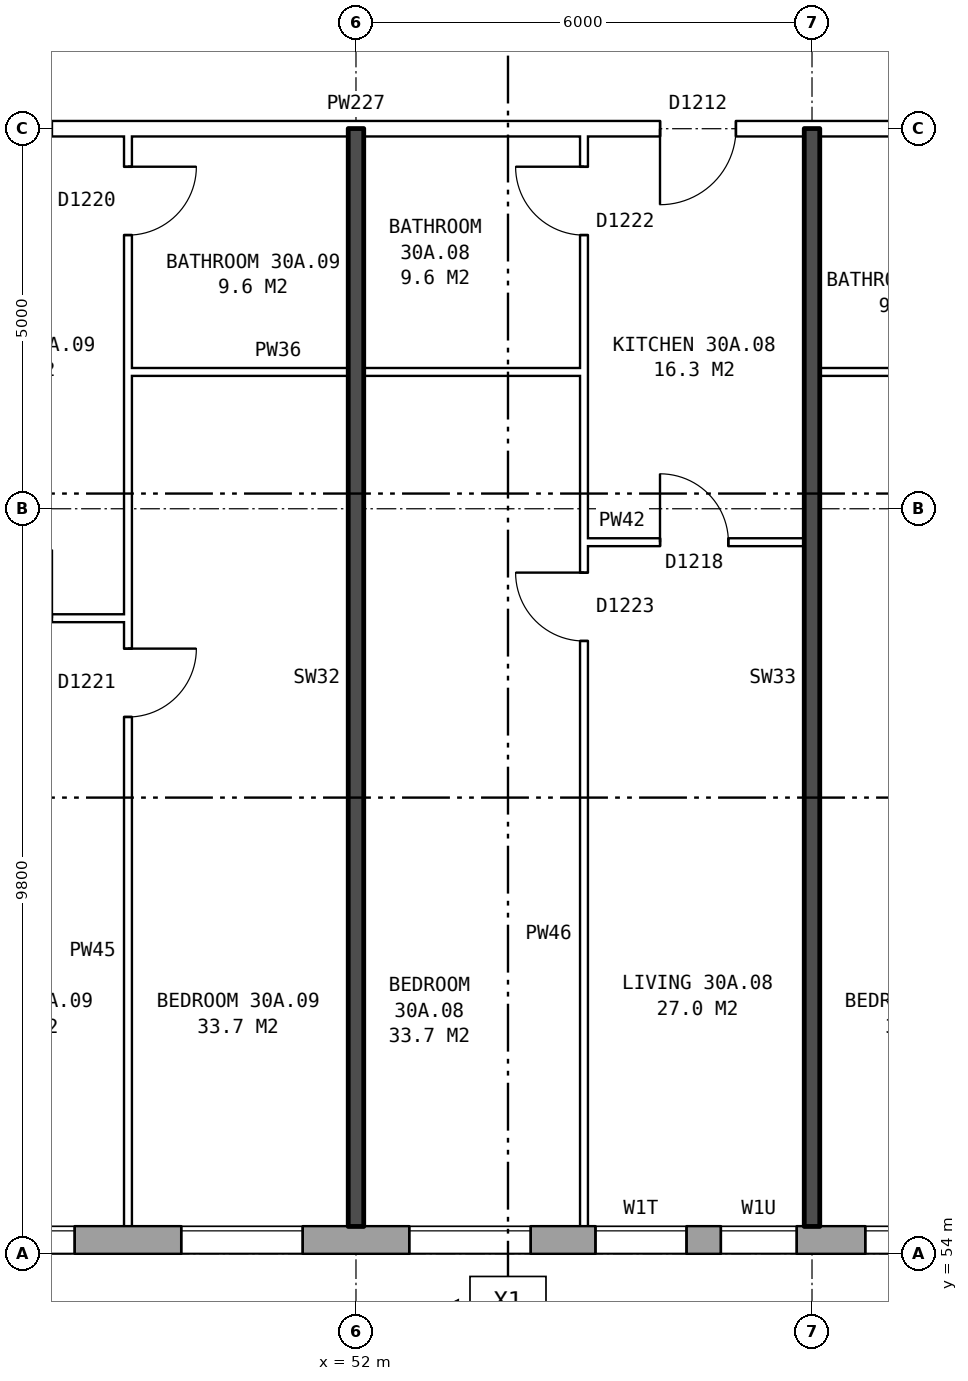
"""IFC4 building model, lengths in metres.
Left out: names, types, materials, properties, quantities, classifications, styles, units other than length and angle.
Written with IfcOpenShell. Run it as: python <this file> out.ifc"""

import sys

from ifc_helpers import new_model, si_unit, direction, frame, frame_2d, origin, place, context, subcontext, project, spatial, rectangle, extrude, element, fill, save


model = new_model("IFC4")
c1 = context("Model", 3, precision=1e-05, world=origin(), true_north=direction((0.0, 1.0)))
c2 = subcontext(c1, "Body", "Model", "MODEL_VIEW")
j1 = project(units=[si_unit("LENGTHUNIT", "METRE"), si_unit("PLANEANGLEUNIT", "RADIAN")], contexts=[c1])
p1 = place(None, origin())
s1 = spatial("IfcSite", under=j1, at=p1, CompositionType="ELEMENT")
p2 = place(p1, origin())
s2 = spatial("IfcBuilding", under=s1, at=p2, CompositionType="ELEMENT")
p3 = place(p2, frame((0.0, 0.0, 108.8)))
s3 = spatial("IfcBuildingStorey", under=s2, at=p3, CompositionType="ELEMENT", Elevation=108.8)
p4 = place(p3, frame((28.075, 54.18, 0.0), z_axis=(0.0, 0.0, 1.0), x_axis=(1.0, 0.0, 0.0)))
e1 = element("IfcWall", 1, at=p4, inside=s3, PredefinedType="STANDARD", context=c2, shape_type="SweptSolid", body=[
    extrude(rectangle(XDim=44.851, YDim=0.36, at=frame_2d((22.425, 0.0))), origin(), (0.0, 0.0, 1.0), 2.85),
])
p5 = place(p4, frame((0.625, 0.0, 0.8)))
e2 = element("IfcOpeningElement", 2, at=p5, cuts=e1, PredefinedType="OPENING", context=c2, shape_type="SweptSolid", body=[
    extrude(rectangle(XDim=1.6, YDim=1.8, at=frame_2d((0.8, 0.9))), frame((0.0, 0.19, 0.0), z_axis=(0.0, -1.0, 0.0), x_axis=(1.0, 0.0, 0.0)), (0.0, 0.0, 1.0), 0.38),
])
p6 = place(p4, frame((3.625, 0.0, 0.8)))
e3 = element("IfcOpeningElement", 3, at=p6, cuts=e1, PredefinedType="OPENING", context=c2, shape_type="SweptSolid", body=[
    extrude(rectangle(XDim=1.6, YDim=1.8, at=frame_2d((0.8, 0.9))), frame((0.0, 0.19, 0.0), z_axis=(0.0, -1.0, 0.0), x_axis=(1.0, 0.0, 0.0)), (0.0, 0.0, 1.0), 0.38),
])
p7 = place(p4, frame((6.625, 0.0, 0.8)))
e4 = element("IfcOpeningElement", 4, at=p7, cuts=e1, PredefinedType="OPENING", context=c2, shape_type="SweptSolid", body=[
    extrude(rectangle(XDim=1.6, YDim=1.8, at=frame_2d((0.8, 0.9))), frame((0.0, 0.19, 0.0), z_axis=(0.0, -1.0, 0.0), x_axis=(1.0, 0.0, 0.0)), (0.0, 0.0, 1.0), 0.38),
])
p8 = place(p4, frame((9.625, 0.0, 0.8)))
e5 = element("IfcOpeningElement", 5, at=p8, cuts=e1, PredefinedType="OPENING", context=c2, shape_type="SweptSolid", body=[
    extrude(rectangle(XDim=1.6, YDim=1.8, at=frame_2d((0.8, 0.9))), frame((0.0, 0.19, 0.0), z_axis=(0.0, -1.0, 0.0), x_axis=(1.0, 0.0, 0.0)), (0.0, 0.0, 1.0), 0.38),
])
p9 = place(p4, frame((12.625, 0.0, 0.8)))
e6 = element("IfcOpeningElement", 6, at=p9, cuts=e1, PredefinedType="OPENING", context=c2, shape_type="SweptSolid", body=[
    extrude(rectangle(XDim=1.6, YDim=1.8, at=frame_2d((0.8, 0.9))), frame((0.0, 0.19, 0.0), z_axis=(0.0, -1.0, 0.0), x_axis=(1.0, 0.0, 0.0)), (0.0, 0.0, 1.0), 0.38),
])
p10 = place(p4, frame((14.525, 0.0, 1.4)))
e7 = element("IfcOpeningElement", 7, at=p10, cuts=e1, PredefinedType="OPENING", context=c2, shape_type="SweptSolid", body=[
    extrude(rectangle(XDim=1.2, YDim=1.2, at=frame_2d((0.6, 0.6))), frame((0.0, 0.19, 0.0), z_axis=(0.0, -1.0, 0.0), x_axis=(1.0, 0.0, 0.0)), (0.0, 0.0, 1.0), 0.38),
])
p11 = place(p4, frame((18.625, 0.0, 0.8)))
e8 = element("IfcOpeningElement", 8, at=p11, cuts=e1, PredefinedType="OPENING", context=c2, shape_type="SweptSolid", body=[
    extrude(rectangle(XDim=1.6, YDim=1.8, at=frame_2d((0.8, 0.9))), frame((0.0, 0.19, 0.0), z_axis=(0.0, -1.0, 0.0), x_axis=(1.0, 0.0, 0.0)), (0.0, 0.0, 1.0), 0.38),
])
p12 = place(p4, frame((21.625, 0.0, 0.8)))
e9 = element("IfcOpeningElement", 9, at=p12, cuts=e1, PredefinedType="OPENING", context=c2, shape_type="SweptSolid", body=[
    extrude(rectangle(XDim=1.6, YDim=1.8, at=frame_2d((0.8, 0.9))), frame((0.0, 0.19, 0.0), z_axis=(0.0, -1.0, 0.0), x_axis=(1.0, 0.0, 0.0)), (0.0, 0.0, 1.0), 0.38),
])
p13 = place(p4, frame((24.625, 0.0, 0.8)))
e10 = element("IfcOpeningElement", 10, at=p13, cuts=e1, PredefinedType="OPENING", context=c2, shape_type="SweptSolid", body=[
    extrude(rectangle(XDim=1.6, YDim=1.8, at=frame_2d((0.8, 0.9))), frame((0.0, 0.19, 0.0), z_axis=(0.0, -1.0, 0.0), x_axis=(1.0, 0.0, 0.0)), (0.0, 0.0, 1.0), 0.38),
])
p14 = place(p4, frame((27.075, 0.0, 0.15)))
e11 = element("IfcOpeningElement", 11, at=p14, cuts=e1, PredefinedType="OPENING", context=c2, shape_type="SweptSolid", body=[
    extrude(rectangle(XDim=1.2, YDim=0.9, at=frame_2d((0.6, 0.45))), frame((0.0, 0.19, 0.0), z_axis=(0.0, -1.0, 0.0), x_axis=(1.0, 0.0, 0.0)), (0.0, 0.0, 1.0), 0.38),
])
p15 = place(p4, frame((30.625, 0.0, 0.8)))
e12 = element("IfcOpeningElement", 12, at=p15, cuts=e1, PredefinedType="OPENING", context=c2, shape_type="SweptSolid", body=[
    extrude(rectangle(XDim=1.6, YDim=1.8, at=frame_2d((0.8, 0.9))), frame((0.0, 0.19, 0.0), z_axis=(0.0, -1.0, 0.0), x_axis=(1.0, 0.0, 0.0)), (0.0, 0.0, 1.0), 0.38),
])
p16 = place(p4, frame((33.625, 0.0, 0.8)))
e13 = element("IfcOpeningElement", 13, at=p16, cuts=e1, PredefinedType="OPENING", context=c2, shape_type="SweptSolid", body=[
    extrude(rectangle(XDim=1.6, YDim=1.8, at=frame_2d((0.8, 0.9))), frame((0.0, 0.19, 0.0), z_axis=(0.0, -1.0, 0.0), x_axis=(1.0, 0.0, 0.0)), (0.0, 0.0, 1.0), 0.38),
])
p17 = place(p4, frame((36.625, 0.0, 0.8)))
e14 = element("IfcOpeningElement", 14, at=p17, cuts=e1, PredefinedType="OPENING", context=c2, shape_type="SweptSolid", body=[
    extrude(rectangle(XDim=1.6, YDim=1.8, at=frame_2d((0.8, 0.9))), frame((0.0, 0.19, 0.0), z_axis=(0.0, -1.0, 0.0), x_axis=(1.0, 0.0, 0.0)), (0.0, 0.0, 1.0), 0.38),
])
p18 = place(p4, frame((39.625, 0.0, 0.8)))
e15 = element("IfcOpeningElement", 15, at=p18, cuts=e1, PredefinedType="OPENING", context=c2, shape_type="SweptSolid", body=[
    extrude(rectangle(XDim=1.6, YDim=1.8, at=frame_2d((0.8, 0.9))), frame((0.0, 0.19, 0.0), z_axis=(0.0, -1.0, 0.0), x_axis=(1.0, 0.0, 0.0)), (0.0, 0.0, 1.0), 0.38),
])
p19 = place(p4, frame((42.625, 0.0, 0.8)))
e16 = element("IfcOpeningElement", 16, at=p19, cuts=e1, PredefinedType="OPENING", context=c2, shape_type="SweptSolid", body=[
    extrude(rectangle(XDim=1.6, YDim=1.8, at=frame_2d((0.8, 0.9))), frame((0.0, 0.19, 0.0), z_axis=(0.0, -1.0, 0.0), x_axis=(1.0, 0.0, 0.0)), (0.0, 0.0, 1.0), 0.38),
])
p20 = place(p4, frame((28.725, 0.0, 1.65)))
e17 = element("IfcOpeningElement", 17, at=p20, cuts=e1, PredefinedType="OPENING", context=c2, shape_type="SweptSolid", body=[
    extrude(rectangle(XDim=1.0, YDim=0.9, at=frame_2d((0.5, 0.45))), frame((0.0, 0.19, 0.0), z_axis=(0.0, -1.0, 0.0), x_axis=(1.0, 0.0, 0.0)), (0.0, 0.0, 1.0), 0.38),
])
p21 = place(p3, frame((46.1, 62.36, 0.0), z_axis=(0.0, 0.0, 1.0), x_axis=(1.0, 0.0, 0.0)))
e18 = element("IfcWall", 18, at=p21, inside=s3, PredefinedType="PARTITIONING", context=c2, shape_type="SweptSolid", body=[
    extrude(rectangle(XDim=2.9, YDim=0.1, at=frame_2d((1.45, 0.0))), origin(), (0.0, 0.0, 1.0), 2.85),
])
p22 = place(p21, frame((1.0, 0.0, 0.0)))
e19 = element("IfcOpeningElement", 19, at=p22, cuts=e18, PredefinedType="OPENING", context=c2, shape_type="SweptSolid", body=[
    extrude(rectangle(XDim=0.9, YDim=2.1, at=frame_2d((0.45, 1.05))), frame((0.0, 0.06, 0.0), z_axis=(0.0, -1.0, 0.0), x_axis=(1.0, 0.0, 0.0)), (0.0, 0.0, 1.0), 0.12),
])
p23 = place(p3, frame((55.0, 63.36, 0.0), z_axis=(0.0, 0.0, 1.0), x_axis=(1.0, 0.0, 0.0)))
e20 = element("IfcWall", 20, at=p23, inside=s3, PredefinedType="PARTITIONING", context=c2, shape_type="SweptSolid", body=[
    extrude(rectangle(XDim=2.9, YDim=0.1, at=frame_2d((1.45, 0.0))), origin(), (0.0, 0.0, 1.0), 2.85),
])
p24 = place(p23, frame((1.0, 0.0, 0.0)))
e21 = element("IfcOpeningElement", 21, at=p24, cuts=e20, PredefinedType="OPENING", context=c2, shape_type="SweptSolid", body=[
    extrude(rectangle(XDim=0.9, YDim=2.1, at=frame_2d((0.45, 1.05))), frame((0.0, 0.06, 0.0), z_axis=(0.0, -1.0, 0.0), x_axis=(1.0, 0.0, 0.0)), (0.0, 0.0, 1.0), 0.12),
])
p25 = place(p3, frame((49.0, 65.6, 0.0), z_axis=(0.0, 0.0, 1.0), x_axis=(1.0, 0.0, 0.0)))
e22 = element("IfcWall", 22, at=p25, inside=s3, PredefinedType="PARTITIONING", context=c2, shape_type="SweptSolid", body=[
    extrude(rectangle(XDim=6.0, YDim=0.1, at=frame_2d((3.0, 0.0))), origin(), (0.0, 0.0, 1.0), 2.85),
])
p26 = place(p3, frame((58.1, 65.6, 0.0), z_axis=(0.0, 0.0, 1.0), x_axis=(1.0, 0.0, 0.0)))
e23 = element("IfcWall", 23, at=p26, inside=s3, PredefinedType="PARTITIONING", context=c2, shape_type="SweptSolid", body=[
    extrude(rectangle(XDim=2.9, YDim=0.1, at=frame_2d((1.45, 0.0))), origin(), (0.0, 0.0, 1.0), 2.85),
])
p27 = place(p3, frame((44.36, 68.8, 0.0), z_axis=(0.0, 0.0, 1.0), x_axis=(1.0, 0.0, 0.0)))
e24 = element("IfcWall", 24, at=p27, inside=s3, PredefinedType="PARTITIONING", context=c2, shape_type="SweptSolid", body=[
    extrude(rectangle(XDim=19.28, YDim=0.2, at=frame_2d((9.64, 0.0))), origin(), (0.0, 0.0, 1.0), 2.85),
])
p28 = place(p27, frame((17.46, 0.0, 0.0)))
e25 = element("IfcOpeningElement", 25, at=p28, cuts=e24, PredefinedType="OPENING", context=c2, shape_type="SweptSolid", body=[
    extrude(rectangle(XDim=1.0, YDim=2.1, at=frame_2d((0.5, 1.05))), frame((0.0, 0.11, 0.0), z_axis=(0.0, -1.0, 0.0), x_axis=(1.0, 0.0, 0.0)), (0.0, 0.0, 1.0), 0.22),
])
p29 = place(p27, frame((11.64, 0.0, 0.0)))
e26 = element("IfcOpeningElement", 26, at=p29, cuts=e24, PredefinedType="OPENING", context=c2, shape_type="SweptSolid", body=[
    extrude(rectangle(XDim=1.0, YDim=2.1, at=frame_2d((0.5, 1.05))), frame((0.0, 0.11, 0.0), z_axis=(0.0, -1.0, 0.0), x_axis=(1.0, 0.0, 0.0)), (0.0, 0.0, 1.0), 0.22),
])
p30 = place(p27, frame((2.64, 0.0, 0.0)))
e27 = element("IfcOpeningElement", 27, at=p30, cuts=e24, PredefinedType="OPENING", context=c2, shape_type="SweptSolid", body=[
    extrude(rectangle(XDim=1.0, YDim=2.1, at=frame_2d((0.5, 1.05))), frame((0.0, 0.11, 0.0), z_axis=(0.0, -1.0, 0.0), x_axis=(1.0, 0.0, 0.0)), (0.0, 0.0, 1.0), 0.22),
])
p31 = place(p3, frame((49.0, 54.36, 0.0), z_axis=(0.0, 0.0, 1.0), x_axis=(0.0, 1.0, 0.0)))
e28 = element("IfcWall", 28, at=p31, inside=s3, PredefinedType="PARTITIONING", context=c2, shape_type="SweptSolid", body=[
    extrude(rectangle(XDim=14.34, YDim=0.1, at=frame_2d((7.17, 0.0))), origin(), (0.0, 0.0, 1.0), 2.85),
])
p32 = place(p31, frame((6.7, 0.0, 0.0)))
e29 = element("IfcOpeningElement", 29, at=p32, cuts=e28, PredefinedType="OPENING", context=c2, shape_type="SweptSolid", body=[
    extrude(rectangle(XDim=0.9, YDim=2.1, at=frame_2d((0.45, 1.05))), frame((0.0, 0.06, 0.0), z_axis=(0.0, -1.0, 0.0), x_axis=(1.0, 0.0, 0.0)), (0.0, 0.0, 1.0), 0.12),
])
p33 = place(p31, frame((13.04, 0.0, 0.0)))
e30 = element("IfcOpeningElement", 30, at=p33, cuts=e28, PredefinedType="OPENING", context=c2, shape_type="SweptSolid", body=[
    extrude(rectangle(XDim=0.9, YDim=2.1, at=frame_2d((0.45, 1.05))), frame((0.0, 0.06, 0.0), z_axis=(0.0, -1.0, 0.0), x_axis=(1.0, 0.0, 0.0)), (0.0, 0.0, 1.0), 0.12),
])
p34 = place(p3, frame((52.0, 54.36, 0.0), z_axis=(0.0, 0.0, 1.0), x_axis=(0.0, 1.0, 0.0)))
e31 = element("IfcWall", 31, at=p34, inside=s3, PredefinedType="SOLIDWALL", context=c2, shape_type="SweptSolid", body=[
    extrude(rectangle(XDim=14.44, YDim=0.2, at=frame_2d((7.22, 0.0))), origin(), (0.0, 0.0, 1.0), 2.85),
])
p35 = place(p3, frame((55.0, 54.36, 0.0), z_axis=(0.0, 0.0, 1.0), x_axis=(0.0, 1.0, 0.0)))
e32 = element("IfcWall", 32, at=p35, inside=s3, PredefinedType="PARTITIONING", context=c2, shape_type="SweptSolid", body=[
    extrude(rectangle(XDim=14.34, YDim=0.1, at=frame_2d((7.17, 0.0))), origin(), (0.0, 0.0, 1.0), 2.85),
])
p36 = place(p35, frame((7.7, 0.0, 0.0)))
e33 = element("IfcOpeningElement", 33, at=p36, cuts=e32, PredefinedType="OPENING", context=c2, shape_type="SweptSolid", body=[
    extrude(rectangle(XDim=0.9, YDim=2.1, at=frame_2d((0.45, 1.05))), frame((0.0, 0.06, 0.0), z_axis=(0.0, -1.0, 0.0), x_axis=(1.0, 0.0, 0.0)), (0.0, 0.0, 1.0), 0.12),
])
p37 = place(p35, frame((13.04, 0.0, 0.0)))
e34 = element("IfcOpeningElement", 34, at=p37, cuts=e32, PredefinedType="OPENING", context=c2, shape_type="SweptSolid", body=[
    extrude(rectangle(XDim=0.9, YDim=2.1, at=frame_2d((0.45, 1.05))), frame((0.0, 0.06, 0.0), z_axis=(0.0, -1.0, 0.0), x_axis=(1.0, 0.0, 0.0)), (0.0, 0.0, 1.0), 0.12),
])
p38 = place(p3, frame((58.0, 54.36, 0.0), z_axis=(0.0, 0.0, 1.0), x_axis=(0.0, 1.0, 0.0)))
e35 = element("IfcWall", 35, at=p38, inside=s3, PredefinedType="SOLIDWALL", context=c2, shape_type="SweptSolid", body=[
    extrude(rectangle(XDim=14.44, YDim=0.2, at=frame_2d((7.22, 0.0))), origin(), (0.0, 0.0, 1.0), 2.85),
])
p39 = place(p11, origin())
e36 = element("IfcWindow", 36, at=p39, inside=s3, PartitioningType="SINGLE_PANEL", PredefinedType="WINDOW", context=c2, shape_type="SweptSolid", body=[
    extrude(rectangle(XDim=1.6, YDim=1.8, at=frame_2d((0.8, 0.9))), frame((0.0, 0.15, 0.0), z_axis=(0.0, -1.0, 0.0), x_axis=(1.0, 0.0, 0.0)), (0.0, 0.0, 1.0), 0.06),
])
fill(e8, e36)
p40 = place(p12, origin())
e37 = element("IfcWindow", 37, at=p40, inside=s3, PartitioningType="SINGLE_PANEL", PredefinedType="WINDOW", context=c2, shape_type="SweptSolid", body=[
    extrude(rectangle(XDim=1.6, YDim=1.8, at=frame_2d((0.8, 0.9))), frame((0.0, 0.15, 0.0), z_axis=(0.0, -1.0, 0.0), x_axis=(1.0, 0.0, 0.0)), (0.0, 0.0, 1.0), 0.06),
])
fill(e9, e37)
p41 = place(p13, origin())
e38 = element("IfcWindow", 38, at=p41, inside=s3, PartitioningType="SINGLE_PANEL", PredefinedType="WINDOW", context=c2, shape_type="SweptSolid", body=[
    extrude(rectangle(XDim=1.6, YDim=1.8, at=frame_2d((0.8, 0.9))), frame((0.0, 0.15, 0.0), z_axis=(0.0, -1.0, 0.0), x_axis=(1.0, 0.0, 0.0)), (0.0, 0.0, 1.0), 0.06),
])
fill(e10, e38)
p42 = place(p14, origin())
e39 = element("IfcWindow", 39, at=p42, inside=s3, PartitioningType="SINGLE_PANEL", PredefinedType="WINDOW", context=c2, shape_type="SweptSolid", body=[
    extrude(rectangle(XDim=1.2, YDim=0.9, at=frame_2d((0.6, 0.45))), frame((0.0, 0.15, 0.0), z_axis=(0.0, -1.0, 0.0), x_axis=(1.0, 0.0, 0.0)), (0.0, 0.0, 1.0), 0.06),
])
fill(e11, e39)
p43 = place(p15, origin())
e40 = element("IfcWindow", 40, at=p43, inside=s3, PartitioningType="SINGLE_PANEL", PredefinedType="WINDOW", context=c2, shape_type="SweptSolid", body=[
    extrude(rectangle(XDim=1.6, YDim=1.8, at=frame_2d((0.8, 0.9))), frame((0.0, 0.15, 0.0), z_axis=(0.0, -1.0, 0.0), x_axis=(1.0, 0.0, 0.0)), (0.0, 0.0, 1.0), 0.06),
])
fill(e12, e40)
p44 = place(p36, origin())
e41 = element("IfcDoor", 41, at=p44, inside=s3, OperationType="SINGLE_SWING_RIGHT", PredefinedType="DOOR", context=c2, shape_type="SweptSolid", body=[
    extrude(rectangle(XDim=0.9, YDim=2.1, at=frame_2d((0.45, 1.05))), frame((0.0, 0.025, 0.0), z_axis=(0.0, -1.0, 0.0), x_axis=(1.0, 0.0, 0.0)), (0.0, 0.0, 1.0), 0.05),
])
fill(e33, e41)
p45 = place(p29, frame((1.0, 0.0, 0.0), z_axis=(0.0, 0.0, 1.0), x_axis=(-1.0, 0.0, 0.0)))
e42 = element("IfcDoor", 42, at=p45, inside=s3, OperationType="SINGLE_SWING_RIGHT", PredefinedType="DOOR", context=c2, shape_type="SweptSolid", body=[
    extrude(rectangle(XDim=1.0, YDim=2.1, at=frame_2d((0.5, 1.05))), frame((0.0, 0.025, 0.0), z_axis=(0.0, -1.0, 0.0), x_axis=(1.0, 0.0, 0.0)), (0.0, 0.0, 1.0), 0.05),
])
fill(e26, e42)
p46 = place(p24, origin())
e43 = element("IfcDoor", 43, at=p46, inside=s3, OperationType="SINGLE_SWING_LEFT", PredefinedType="DOOR", context=c2, shape_type="SweptSolid", body=[
    extrude(rectangle(XDim=0.9, YDim=2.1, at=frame_2d((0.45, 1.05))), frame((0.0, 0.025, 0.0), z_axis=(0.0, -1.0, 0.0), x_axis=(1.0, 0.0, 0.0)), (0.0, 0.0, 1.0), 0.05),
])
fill(e21, e43)
p47 = place(p37, origin())
e44 = element("IfcDoor", 44, at=p47, inside=s3, OperationType="SINGLE_SWING_RIGHT", PredefinedType="DOOR", context=c2, shape_type="SweptSolid", body=[
    extrude(rectangle(XDim=0.9, YDim=2.1, at=frame_2d((0.45, 1.05))), frame((0.0, 0.025, 0.0), z_axis=(0.0, -1.0, 0.0), x_axis=(1.0, 0.0, 0.0)), (0.0, 0.0, 1.0), 0.05),
])
fill(e34, e44)
p48 = place(p32, frame((0.9, 0.0, 0.0), z_axis=(0.0, 0.0, 1.0), x_axis=(-1.0, 0.0, 0.0)))
e45 = element("IfcDoor", 45, at=p48, inside=s3, OperationType="SINGLE_SWING_LEFT", PredefinedType="DOOR", context=c2, shape_type="SweptSolid", body=[
    extrude(rectangle(XDim=0.9, YDim=2.1, at=frame_2d((0.45, 1.05))), frame((0.0, 0.025, 0.0), z_axis=(0.0, -1.0, 0.0), x_axis=(1.0, 0.0, 0.0)), (0.0, 0.0, 1.0), 0.05),
])
fill(e29, e45)
p49 = place(p33, frame((0.9, 0.0, 0.0), z_axis=(0.0, 0.0, 1.0), x_axis=(-1.0, 0.0, 0.0)))
e46 = element("IfcDoor", 46, at=p49, inside=s3, OperationType="SINGLE_SWING_LEFT", PredefinedType="DOOR", context=c2, shape_type="SweptSolid", body=[
    extrude(rectangle(XDim=0.9, YDim=2.1, at=frame_2d((0.45, 1.05))), frame((0.0, 0.025, 0.0), z_axis=(0.0, -1.0, 0.0), x_axis=(1.0, 0.0, 0.0)), (0.0, 0.0, 1.0), 0.05),
])
fill(e30, e46)
p50 = place(p20, origin())
e47 = element("IfcWindow", 47, at=p50, inside=s3, PartitioningType="SINGLE_PANEL", PredefinedType="WINDOW", context=c2, shape_type="SweptSolid", body=[
    extrude(rectangle(XDim=1.0, YDim=0.9, at=frame_2d((0.5, 0.45))), frame((0.0, 0.15, 0.0), z_axis=(0.0, -1.0, 0.0), x_axis=(1.0, 0.0, 0.0)), (0.0, 0.0, 1.0), 0.06),
])
fill(e17, e47)
save(model, sys.argv[1])
